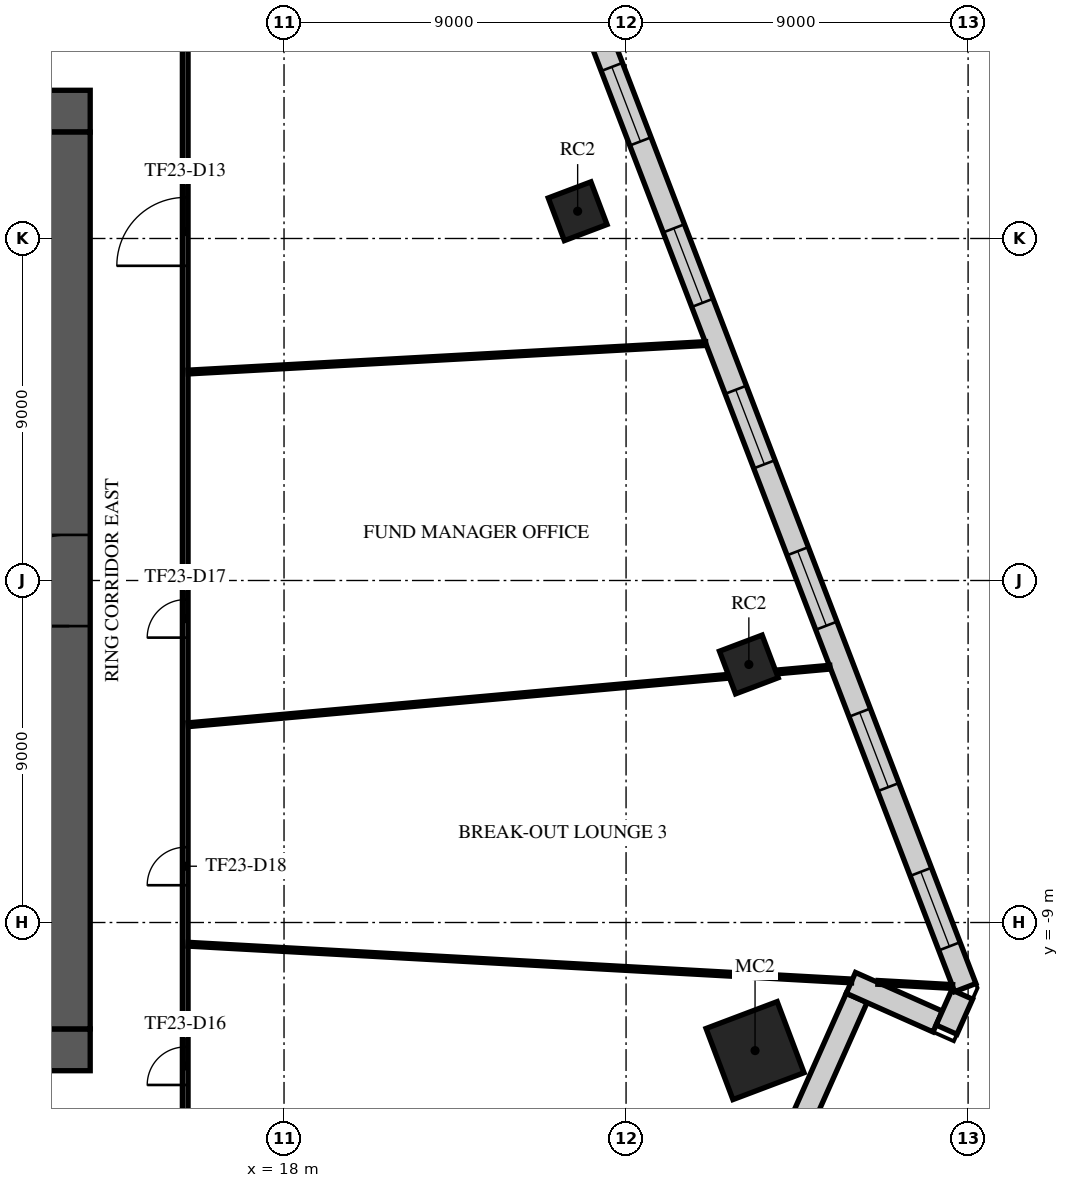
"""IFC4 building model, lengths in metres.
Left out: names, types, materials, properties, quantities, classifications, styles, units other than length and angle.
Written with IfcOpenShell. Run it as: python <this file> out.ifc"""

import sys

from ifc_helpers import new_model, si_unit, direction, frame, frame_2d, origin, origin_2d, place, context, subcontext, project, spatial, rectangle, extrude, element, fill, save


model = new_model("IFC4")
c1 = context("Model", 3, precision=1e-05, world=origin(), true_north=direction((0.0, 1.0)))
c2 = subcontext(c1, "Body", "Model", "MODEL_VIEW")
j1 = project(units=[si_unit("LENGTHUNIT", "METRE"), si_unit("PLANEANGLEUNIT", "RADIAN")], contexts=[c1])
p1 = place(None, origin())
s1 = spatial("IfcSite", under=j1, at=p1, CompositionType="ELEMENT")
p2 = place(p1, origin())
s2 = spatial("IfcBuilding", under=s1, at=p2, CompositionType="ELEMENT")
p3 = place(p2, frame((0.0, 0.0, 102.1)))
s3 = spatial("IfcBuildingStorey", under=s2, at=p3, CompositionType="ELEMENT", Elevation=102.1)
p4 = place(p3, frame((30.394, -12.371, 0.0), z_axis=(0.0, 0.0, 1.0), x_axis=(0.935491525991, 0.353349125935, 0.0)))
e1 = element("IfcColumn", 1, at=p4, inside=s3, PredefinedType="COLUMN", context=c2, shape_type="SweptSolid", body=[
    extrude(rectangle(XDim=2.0, YDim=2.0, at=origin_2d()), origin(), (0.0, 0.0, 1.0), 4.0),
])
for number, where, z_axis, x_axis in (
    (2, (30.231, -2.21, 0.0), (0.0, 0.0, 1.0), (0.935, 0.353, 0.0)),
    (3, (25.726, 9.717, 0.0), (0.0, 0.0, 1.0), (0.935, 0.353, 0.0)),
):
    element("IfcColumn", number, at=place(p3, frame(where, z_axis=z_axis, x_axis=x_axis)), inside=s3, PredefinedType="COLUMN", context=c2, shape_type="SweptSolid", body=[
        extrude(rectangle(XDim=1.2, YDim=1.2, at=origin_2d()), origin(), (0.0, 0.0, 1.0), 4.0),
    ])
p5 = place(p3, frame((-12.9, 12.35, 0.0), z_axis=(0.0, 0.0, 1.0), x_axis=(1.0, 0.0, 0.0)))
e4 = element("IfcWall", 4, at=p5, inside=s3, PredefinedType="SHEAR", context=c2, shape_type="SweptSolid", body=[
    extrude(rectangle(XDim=25.8, YDim=1.1, at=frame_2d((12.9, 0.0))), origin(), (0.0, 0.0, 1.0), 3.58),
])
p6 = place(p5, frame((11.7, 0.0, 0.0)))
e5 = element("IfcOpeningElement", 5, at=p6, cuts=e4, PredefinedType="OPENING", context=c2, shape_type="SweptSolid", body=[
    extrude(rectangle(XDim=2.4, YDim=2.4, at=frame_2d((1.2, 1.2))), frame((0.0, 0.56, 0.0), z_axis=(0.0, -1.0, 0.0), x_axis=(1.0, 0.0, 0.0)), (0.0, 0.0, 1.0), 1.12),
])
p7 = place(p5, frame((22.525, 0.0, 0.0)))
e6 = element("IfcOpeningElement", 6, at=p7, cuts=e4, PredefinedType="OPENING", context=c2, shape_type="SweptSolid", body=[
    extrude(rectangle(XDim=1.2, YDim=2.1, at=frame_2d((0.6, 1.05))), frame((0.0, 0.56, 0.0), z_axis=(0.0, -1.0, 0.0), x_axis=(1.0, 0.0, 0.0)), (0.0, 0.0, 1.0), 1.12),
])
p8 = place(p5, frame((1.5, 0.0, 0.0)))
e7 = element("IfcOpeningElement", 7, at=p8, cuts=e4, PredefinedType="OPENING", context=c2, shape_type="SweptSolid", body=[
    extrude(rectangle(XDim=1.0, YDim=2.1, at=frame_2d((0.5, 1.05))), frame((0.0, 0.56, 0.0), z_axis=(0.0, -1.0, 0.0), x_axis=(1.0, 0.0, 0.0)), (0.0, 0.0, 1.0), 1.12),
])
p9 = place(p3, frame((-12.9, -12.35, 0.0), z_axis=(0.0, 0.0, 1.0), x_axis=(1.0, 0.0, 0.0)))
e8 = element("IfcWall", 8, at=p9, inside=s3, PredefinedType="SHEAR", context=c2, shape_type="SweptSolid", body=[
    extrude(rectangle(XDim=25.8, YDim=1.1, at=frame_2d((12.9, 0.0))), origin(), (0.0, 0.0, 1.0), 3.58),
])
p10 = place(p9, frame((7.8, 0.0, 0.0)))
e9 = element("IfcOpeningElement", 9, at=p10, cuts=e8, PredefinedType="OPENING", context=c2, shape_type="SweptSolid", body=[
    extrude(rectangle(XDim=2.0, YDim=2.1, at=frame_2d((1.0, 1.05))), frame((0.0, 0.56, 0.0), z_axis=(0.0, -1.0, 0.0), x_axis=(1.0, 0.0, 0.0)), (0.0, 0.0, 1.0), 1.12),
])
p11 = place(p9, frame((17.925, 0.0, 0.0)))
e10 = element("IfcOpeningElement", 10, at=p11, cuts=e8, PredefinedType="OPENING", context=c2, shape_type="SweptSolid", body=[
    extrude(rectangle(XDim=1.2, YDim=2.1, at=frame_2d((0.6, 1.05))), frame((0.0, 0.56, 0.0), z_axis=(0.0, -1.0, 0.0), x_axis=(1.0, 0.0, 0.0)), (0.0, 0.0, 1.0), 1.12),
])
p12 = place(p9, frame((2.075, 0.0, 0.0)))
e11 = element("IfcOpeningElement", 11, at=p12, cuts=e8, PredefinedType="OPENING", context=c2, shape_type="SweptSolid", body=[
    extrude(rectangle(XDim=1.2, YDim=2.1, at=frame_2d((0.6, 1.05))), frame((0.0, 0.56, 0.0), z_axis=(0.0, -1.0, 0.0), x_axis=(1.0, 0.0, 0.0)), (0.0, 0.0, 1.0), 1.12),
])
p13 = place(p9, frame((22.525, 0.0, 0.0)))
e12 = element("IfcOpeningElement", 12, at=p13, cuts=e8, PredefinedType="OPENING", context=c2, shape_type="SweptSolid", body=[
    extrude(rectangle(XDim=1.2, YDim=2.1, at=frame_2d((0.6, 1.05))), frame((0.0, 0.56, 0.0), z_axis=(0.0, -1.0, 0.0), x_axis=(1.0, 0.0, 0.0)), (0.0, 0.0, 1.0), 1.12),
])
p14 = place(p3, frame((12.35, -11.8, 0.0), z_axis=(0.0, 0.0, 1.0), x_axis=(0.0, 1.0, 0.0)))
e13 = element("IfcWall", 13, at=p14, inside=s3, PredefinedType="SHEAR", context=c2, shape_type="SweptSolid", body=[
    extrude(rectangle(XDim=23.6, YDim=1.1, at=frame_2d((11.8, 0.0))), origin(), (0.0, 0.0, 1.0), 3.58),
])
p15 = place(p14, frame((10.6, 0.0, 0.0)))
e14 = element("IfcOpeningElement", 14, at=p15, cuts=e13, PredefinedType="OPENING", context=c2, shape_type="SweptSolid", body=[
    extrude(rectangle(XDim=2.4, YDim=2.4, at=frame_2d((1.2, 1.2))), frame((0.0, 0.56, 0.0), z_axis=(0.0, -1.0, 0.0), x_axis=(1.0, 0.0, 0.0)), (0.0, 0.0, 1.0), 1.12),
])
p16 = place(p3, frame((31.44, -14.639, 0.0), z_axis=(0.0, 0.0, 1.0), x_axis=(0.406727323635, 0.913549606868, 0.0)))
e15 = element("IfcWall", 15, at=p16, inside=s3, PredefinedType="STANDARD", context=c2, shape_type="SweptSolid", body=[
    extrude(rectangle(XDim=4.0, YDim=0.6, at=frame_2d((2.0, 0.0))), origin(), (0.0, 0.0, 1.0), 3.58),
])
p17 = place(p3, frame((32.915, -10.589, 0.0), z_axis=(0.0, 0.0, 1.0), x_axis=(0.913549606868, -0.406727323635, 0.0)))
e16 = element("IfcWall", 16, at=p17, inside=s3, PredefinedType="STANDARD", context=c2, shape_type="SweptSolid", body=[
    extrude(rectangle(XDim=2.5, YDim=0.6, at=frame_2d((1.25, 0.0))), origin(), (0.0, 0.0, 1.0), 3.58),
])
p18 = place(p3, frame((35.433, -11.819, 0.0), z_axis=(0.0, 0.0, 1.0), x_axis=(0.406787949875, 0.913522612657, 0.0)))
e17 = element("IfcWall", 17, at=p18, inside=s3, PredefinedType="STANDARD", context=c2, shape_type="SweptSolid", body=[
    extrude(rectangle(XDim=1.011, YDim=0.6, at=frame_2d((0.506, 0.0))), origin(), (0.0, 0.0, 1.0), 3.58),
])
p19 = place(p3, frame((35.925, -10.713, 0.0), z_axis=(0.0, 0.0, 1.0), x_axis=(-0.35836716154, 0.933580728984, 0.0)))
e18 = element("IfcWall", 18, at=p19, inside=s3, PredefinedType="STANDARD", context=c2, shape_type="SweptSolid", body=[
    extrude(rectangle(XDim=45.376, YDim=0.6, at=frame_2d((22.688, 0.0))), origin(), (0.0, 0.0, 1.0), 3.58),
])
p20 = place(p19, frame((1.163, 0.0, 0.9)))
e19 = element("IfcOpeningElement", 19, at=p20, cuts=e18, PredefinedType="OPENING", context=c2, shape_type="SweptSolid", body=[
    extrude(rectangle(XDim=2.1, YDim=2.1, at=frame_2d((1.05, 1.05))), frame((0.0, 0.31, 0.0), z_axis=(0.0, -1.0, 0.0), x_axis=(1.0, 0.0, 0.0)), (0.0, 0.0, 1.0), 0.62),
])
p21 = place(p19, frame((5.651, 0.0, 0.9)))
e20 = element("IfcOpeningElement", 20, at=p21, cuts=e18, PredefinedType="OPENING", context=c2, shape_type="SweptSolid", body=[
    extrude(rectangle(XDim=2.1, YDim=2.1, at=frame_2d((1.05, 1.05))), frame((0.0, 0.31, 0.0), z_axis=(0.0, -1.0, 0.0), x_axis=(1.0, 0.0, 0.0)), (0.0, 0.0, 1.0), 0.62),
])
p22 = place(p19, frame((10.201, 0.0, 0.9)))
e21 = element("IfcOpeningElement", 21, at=p22, cuts=e18, PredefinedType="OPENING", context=c2, shape_type="SweptSolid", body=[
    extrude(rectangle(XDim=2.1, YDim=2.1, at=frame_2d((1.05, 1.05))), frame((0.0, 0.31, 0.0), z_axis=(0.0, -1.0, 0.0), x_axis=(1.0, 0.0, 0.0)), (0.0, 0.0, 1.0), 0.62),
])
p23 = place(p19, frame((14.751, 0.0, 0.9)))
e22 = element("IfcOpeningElement", 22, at=p23, cuts=e18, PredefinedType="OPENING", context=c2, shape_type="SweptSolid", body=[
    extrude(rectangle(XDim=2.1, YDim=2.1, at=frame_2d((1.05, 1.05))), frame((0.0, 0.31, 0.0), z_axis=(0.0, -1.0, 0.0), x_axis=(1.0, 0.0, 0.0)), (0.0, 0.0, 1.0), 0.62),
])
p24 = place(p19, frame((19.301, 0.0, 0.9)))
e23 = element("IfcOpeningElement", 23, at=p24, cuts=e18, PredefinedType="OPENING", context=c2, shape_type="SweptSolid", body=[
    extrude(rectangle(XDim=2.1, YDim=2.1, at=frame_2d((1.05, 1.05))), frame((0.0, 0.31, 0.0), z_axis=(0.0, -1.0, 0.0), x_axis=(1.0, 0.0, 0.0)), (0.0, 0.0, 1.0), 0.62),
])
p25 = place(p19, frame((23.851, 0.0, 0.9)))
e24 = element("IfcOpeningElement", 24, at=p25, cuts=e18, PredefinedType="OPENING", context=c2, shape_type="SweptSolid", body=[
    extrude(rectangle(XDim=2.1, YDim=2.1, at=frame_2d((1.05, 1.05))), frame((0.0, 0.31, 0.0), z_axis=(0.0, -1.0, 0.0), x_axis=(1.0, 0.0, 0.0)), (0.0, 0.0, 1.0), 0.62),
])
p26 = place(p19, frame((28.401, 0.0, 0.9)))
e25 = element("IfcOpeningElement", 25, at=p26, cuts=e18, PredefinedType="OPENING", context=c2, shape_type="SweptSolid", body=[
    extrude(rectangle(XDim=2.1, YDim=2.1, at=frame_2d((1.05, 1.05))), frame((0.0, 0.31, 0.0), z_axis=(0.0, -1.0, 0.0), x_axis=(1.0, 0.0, 0.0)), (0.0, 0.0, 1.0), 0.62),
])
p27 = place(p19, frame((32.951, 0.0, 0.9)))
e26 = element("IfcOpeningElement", 26, at=p27, cuts=e18, PredefinedType="OPENING", context=c2, shape_type="SweptSolid", body=[
    extrude(rectangle(XDim=2.1, YDim=2.1, at=frame_2d((1.05, 1.05))), frame((0.0, 0.31, 0.0), z_axis=(0.0, -1.0, 0.0), x_axis=(1.0, 0.0, 0.0)), (0.0, 0.0, 1.0), 0.62),
])
p28 = place(p19, frame((37.501, 0.0, 0.9)))
e27 = element("IfcOpeningElement", 27, at=p28, cuts=e18, PredefinedType="OPENING", context=c2, shape_type="SweptSolid", body=[
    extrude(rectangle(XDim=2.1, YDim=2.1, at=frame_2d((1.05, 1.05))), frame((0.0, 0.31, 0.0), z_axis=(0.0, -1.0, 0.0), x_axis=(1.0, 0.0, 0.0)), (0.0, 0.0, 1.0), 0.62),
])
p29 = place(p19, frame((42.051, 0.0, 0.9)))
e28 = element("IfcOpeningElement", 28, at=p29, cuts=e18, PredefinedType="OPENING", context=c2, shape_type="SweptSolid", body=[
    extrude(rectangle(XDim=2.1, YDim=2.1, at=frame_2d((1.05, 1.05))), frame((0.0, 0.31, 0.0), z_axis=(0.0, -1.0, 0.0), x_axis=(1.0, 0.0, 0.0)), (0.0, 0.0, 1.0), 0.62),
])
p30 = place(p3, frame((15.4, -15.325, 0.0), z_axis=(0.0, 0.0, 1.0), x_axis=(0.0, 1.0, 0.0)))
e29 = element("IfcWall", 29, at=p30, inside=s3, PredefinedType="PARTITIONING", context=c2, shape_type="SweptSolid", body=[
    extrude(rectangle(XDim=30.65, YDim=0.15, at=frame_2d((15.325, 0.0))), origin(), (0.0, 0.0, 1.0), 3.08),
])
p31 = place(p30, frame((23.606, 0.0, 0.0)))
e30 = element("IfcOpeningElement", 30, at=p31, cuts=e29, PredefinedType="OPENING", context=c2, shape_type="SweptSolid", body=[
    extrude(rectangle(XDim=1.8, YDim=2.1, at=frame_2d((0.9, 1.05))), frame((0.0, 0.085, 0.0), z_axis=(0.0, -1.0, 0.0), x_axis=(1.0, 0.0, 0.0)), (0.0, 0.0, 1.0), 0.17),
])
p32 = place(p30, frame((2.05, 0.0, 0.0)))
e31 = element("IfcOpeningElement", 31, at=p32, cuts=e29, PredefinedType="OPENING", context=c2, shape_type="SweptSolid", body=[
    extrude(rectangle(XDim=1.0, YDim=2.1, at=frame_2d((0.5, 1.05))), frame((0.0, 0.085, 0.0), z_axis=(0.0, -1.0, 0.0), x_axis=(1.0, 0.0, 0.0)), (0.0, 0.0, 1.0), 0.17),
])
p33 = place(p30, frame((13.822, 0.0, 0.0)))
e32 = element("IfcOpeningElement", 32, at=p33, cuts=e29, PredefinedType="OPENING", context=c2, shape_type="SweptSolid", body=[
    extrude(rectangle(XDim=1.0, YDim=2.1, at=frame_2d((0.5, 1.05))), frame((0.0, 0.085, 0.0), z_axis=(0.0, -1.0, 0.0), x_axis=(1.0, 0.0, 0.0)), (0.0, 0.0, 1.0), 0.17),
])
p34 = place(p30, frame((7.306, 0.0, 0.0)))
e33 = element("IfcOpeningElement", 33, at=p34, cuts=e29, PredefinedType="OPENING", context=c2, shape_type="SweptSolid", body=[
    extrude(rectangle(XDim=1.0, YDim=2.1, at=frame_2d((0.5, 1.05))), frame((0.0, 0.085, 0.0), z_axis=(0.0, -1.0, 0.0), x_axis=(1.0, 0.0, 0.0)), (0.0, 0.0, 1.0), 0.17),
])
p35 = place(p3, frame((15.478, -9.571, 0.0), z_axis=(0.0, 0.0, 1.0), x_axis=(0.998469362273, -0.055307617944, 0.0)))
e34 = element("IfcWall", 34, at=p35, inside=s3, PredefinedType="PARTITIONING", context=c2, shape_type="SweptSolid", body=[
    extrude(rectangle(XDim=17.485, YDim=0.1, at=frame_2d((8.742, 0.0))), origin(), (0.0, 0.0, 1.0), 2.83),
])
p36 = place(p3, frame((15.479, -3.796, 0.0), z_axis=(0.0, 0.0, 1.0), x_axis=(0.995999820124, 0.089355236634, 0.0)))
e35 = element("IfcWall", 35, at=p36, inside=s3, PredefinedType="PARTITIONING", context=c2, shape_type="SweptSolid", body=[
    extrude(rectangle(XDim=14.284, YDim=0.1, at=frame_2d((7.142, 0.0))), origin(), (0.0, 0.0, 1.0), 2.96),
])
p37 = place(p3, frame((15.478, 5.485, 0.0), z_axis=(0.0, 0.0, 1.0), x_axis=(0.998486949927, 0.054989188257, 0.0)))
e36 = element("IfcWall", 36, at=p37, inside=s3, PredefinedType="PARTITIONING", context=c2, shape_type="SweptSolid", body=[
    extrude(rectangle(XDim=13.639, YDim=0.1, at=frame_2d((6.82, 0.0))), origin(), (0.0, 0.0, 1.0), 2.83),
])
p38 = place(p3, frame((30.947, -2.408, 0.0), z_axis=(0.0, 0.0, 1.0), x_axis=(0.995999359609, 0.089360369615, 0.0)))
e37 = element("IfcWall", 37, at=p38, inside=s3, PredefinedType="PARTITIONING", context=c2, shape_type="SweptSolid", body=[
    extrude(rectangle(XDim=1.423, YDim=0.1, at=frame_2d((0.712, 0.0))), origin(), (0.0, 0.0, 1.0), 3.58),
])
p39 = place(p3, frame((33.628, -10.576, 0.0), z_axis=(0.0, 0.0, 1.0), x_axis=(0.998471795395, -0.055263675243, 0.0)))
e38 = element("IfcWall", 38, at=p39, inside=s3, PredefinedType="PARTITIONING", context=c2, shape_type="SweptSolid", body=[
    extrude(rectangle(XDim=1.966, YDim=0.1, at=frame_2d((0.983, 0.0))), origin(), (0.0, 0.0, 1.0), 3.58),
])
p40 = place(p15, origin())
e39 = element("IfcDoor", 39, at=p40, inside=s3, OperationType="SINGLE_SWING_LEFT", PredefinedType="DOOR", context=c2, shape_type="SweptSolid", body=[
    extrude(rectangle(XDim=2.4, YDim=2.4, at=frame_2d((1.2, 1.2))), frame((0.0, 0.025, 0.0), z_axis=(0.0, -1.0, 0.0), x_axis=(1.0, 0.0, 0.0)), (0.0, 0.0, 1.0), 0.05),
])
fill(e14, e39)
p41 = place(p20, origin())
e40 = element("IfcWindow", 40, at=p41, inside=s3, PartitioningType="SINGLE_PANEL", PredefinedType="WINDOW", context=c2, shape_type="SweptSolid", body=[
    extrude(rectangle(XDim=2.1, YDim=2.1, at=frame_2d((1.05, 1.05))), frame((0.0, 0.03, 0.0), z_axis=(0.0, -1.0, 0.0), x_axis=(1.0, 0.0, 0.0)), (0.0, 0.0, 1.0), 0.06),
])
fill(e19, e40)
p42 = place(p21, origin())
e41 = element("IfcWindow", 41, at=p42, inside=s3, PartitioningType="SINGLE_PANEL", PredefinedType="WINDOW", context=c2, shape_type="SweptSolid", body=[
    extrude(rectangle(XDim=2.1, YDim=2.1, at=frame_2d((1.05, 1.05))), frame((0.0, 0.03, 0.0), z_axis=(0.0, -1.0, 0.0), x_axis=(1.0, 0.0, 0.0)), (0.0, 0.0, 1.0), 0.06),
])
fill(e20, e41)
p43 = place(p22, origin())
e42 = element("IfcWindow", 42, at=p43, inside=s3, PartitioningType="SINGLE_PANEL", PredefinedType="WINDOW", context=c2, shape_type="SweptSolid", body=[
    extrude(rectangle(XDim=2.1, YDim=2.1, at=frame_2d((1.05, 1.05))), frame((0.0, 0.03, 0.0), z_axis=(0.0, -1.0, 0.0), x_axis=(1.0, 0.0, 0.0)), (0.0, 0.0, 1.0), 0.06),
])
fill(e21, e42)
p44 = place(p23, origin())
e43 = element("IfcWindow", 43, at=p44, inside=s3, PartitioningType="SINGLE_PANEL", PredefinedType="WINDOW", context=c2, shape_type="SweptSolid", body=[
    extrude(rectangle(XDim=2.1, YDim=2.1, at=frame_2d((1.05, 1.05))), frame((0.0, 0.03, 0.0), z_axis=(0.0, -1.0, 0.0), x_axis=(1.0, 0.0, 0.0)), (0.0, 0.0, 1.0), 0.06),
])
fill(e22, e43)
p45 = place(p24, origin())
e44 = element("IfcWindow", 44, at=p45, inside=s3, PartitioningType="SINGLE_PANEL", PredefinedType="WINDOW", context=c2, shape_type="SweptSolid", body=[
    extrude(rectangle(XDim=2.1, YDim=2.1, at=frame_2d((1.05, 1.05))), frame((0.0, 0.03, 0.0), z_axis=(0.0, -1.0, 0.0), x_axis=(1.0, 0.0, 0.0)), (0.0, 0.0, 1.0), 0.06),
])
fill(e23, e44)
p46 = place(p25, origin())
e45 = element("IfcWindow", 45, at=p46, inside=s3, PartitioningType="SINGLE_PANEL", PredefinedType="WINDOW", context=c2, shape_type="SweptSolid", body=[
    extrude(rectangle(XDim=2.1, YDim=2.1, at=frame_2d((1.05, 1.05))), frame((0.0, 0.03, 0.0), z_axis=(0.0, -1.0, 0.0), x_axis=(1.0, 0.0, 0.0)), (0.0, 0.0, 1.0), 0.06),
])
fill(e24, e45)
p47 = place(p31, frame((1.8, 0.0, 0.0), z_axis=(0.0, 0.0, 1.0), x_axis=(-1.0, 0.0, 0.0)))
e46 = element("IfcDoor", 46, at=p47, inside=s3, OperationType="DOUBLE_DOOR_SINGLE_SWING", PredefinedType="DOOR", context=c2, shape_type="SweptSolid", body=[
    extrude(rectangle(XDim=1.8, YDim=2.1, at=frame_2d((0.9, 1.05))), frame((0.0, 0.025, 0.0), z_axis=(0.0, -1.0, 0.0), x_axis=(1.0, 0.0, 0.0)), (0.0, 0.0, 1.0), 0.05),
])
fill(e30, e46)
p48 = place(p32, frame((1.0, 0.0, 0.0), z_axis=(0.0, 0.0, 1.0), x_axis=(-1.0, 0.0, 0.0)))
e47 = element("IfcDoor", 47, at=p48, inside=s3, OperationType="SINGLE_SWING_RIGHT", PredefinedType="DOOR", context=c2, shape_type="SweptSolid", body=[
    extrude(rectangle(XDim=1.0, YDim=2.1, at=frame_2d((0.5, 1.05))), frame((0.0, 0.025, 0.0), z_axis=(0.0, -1.0, 0.0), x_axis=(1.0, 0.0, 0.0)), (0.0, 0.0, 1.0), 0.05),
])
fill(e31, e47)
p49 = place(p33, frame((1.0, 0.0, 0.0), z_axis=(0.0, 0.0, 1.0), x_axis=(-1.0, 0.0, 0.0)))
e48 = element("IfcDoor", 48, at=p49, inside=s3, OperationType="SINGLE_SWING_RIGHT", PredefinedType="DOOR", context=c2, shape_type="SweptSolid", body=[
    extrude(rectangle(XDim=1.0, YDim=2.1, at=frame_2d((0.5, 1.05))), frame((0.0, 0.025, 0.0), z_axis=(0.0, -1.0, 0.0), x_axis=(1.0, 0.0, 0.0)), (0.0, 0.0, 1.0), 0.05),
])
fill(e32, e48)
p50 = place(p34, frame((1.0, 0.0, 0.0), z_axis=(0.0, 0.0, 1.0), x_axis=(-1.0, 0.0, 0.0)))
e49 = element("IfcDoor", 49, at=p50, inside=s3, OperationType="SINGLE_SWING_RIGHT", PredefinedType="DOOR", context=c2, shape_type="SweptSolid", body=[
    extrude(rectangle(XDim=1.0, YDim=2.1, at=frame_2d((0.5, 1.05))), frame((0.0, 0.025, 0.0), z_axis=(0.0, -1.0, 0.0), x_axis=(1.0, 0.0, 0.0)), (0.0, 0.0, 1.0), 0.05),
])
fill(e33, e49)
save(model, sys.argv[1])
